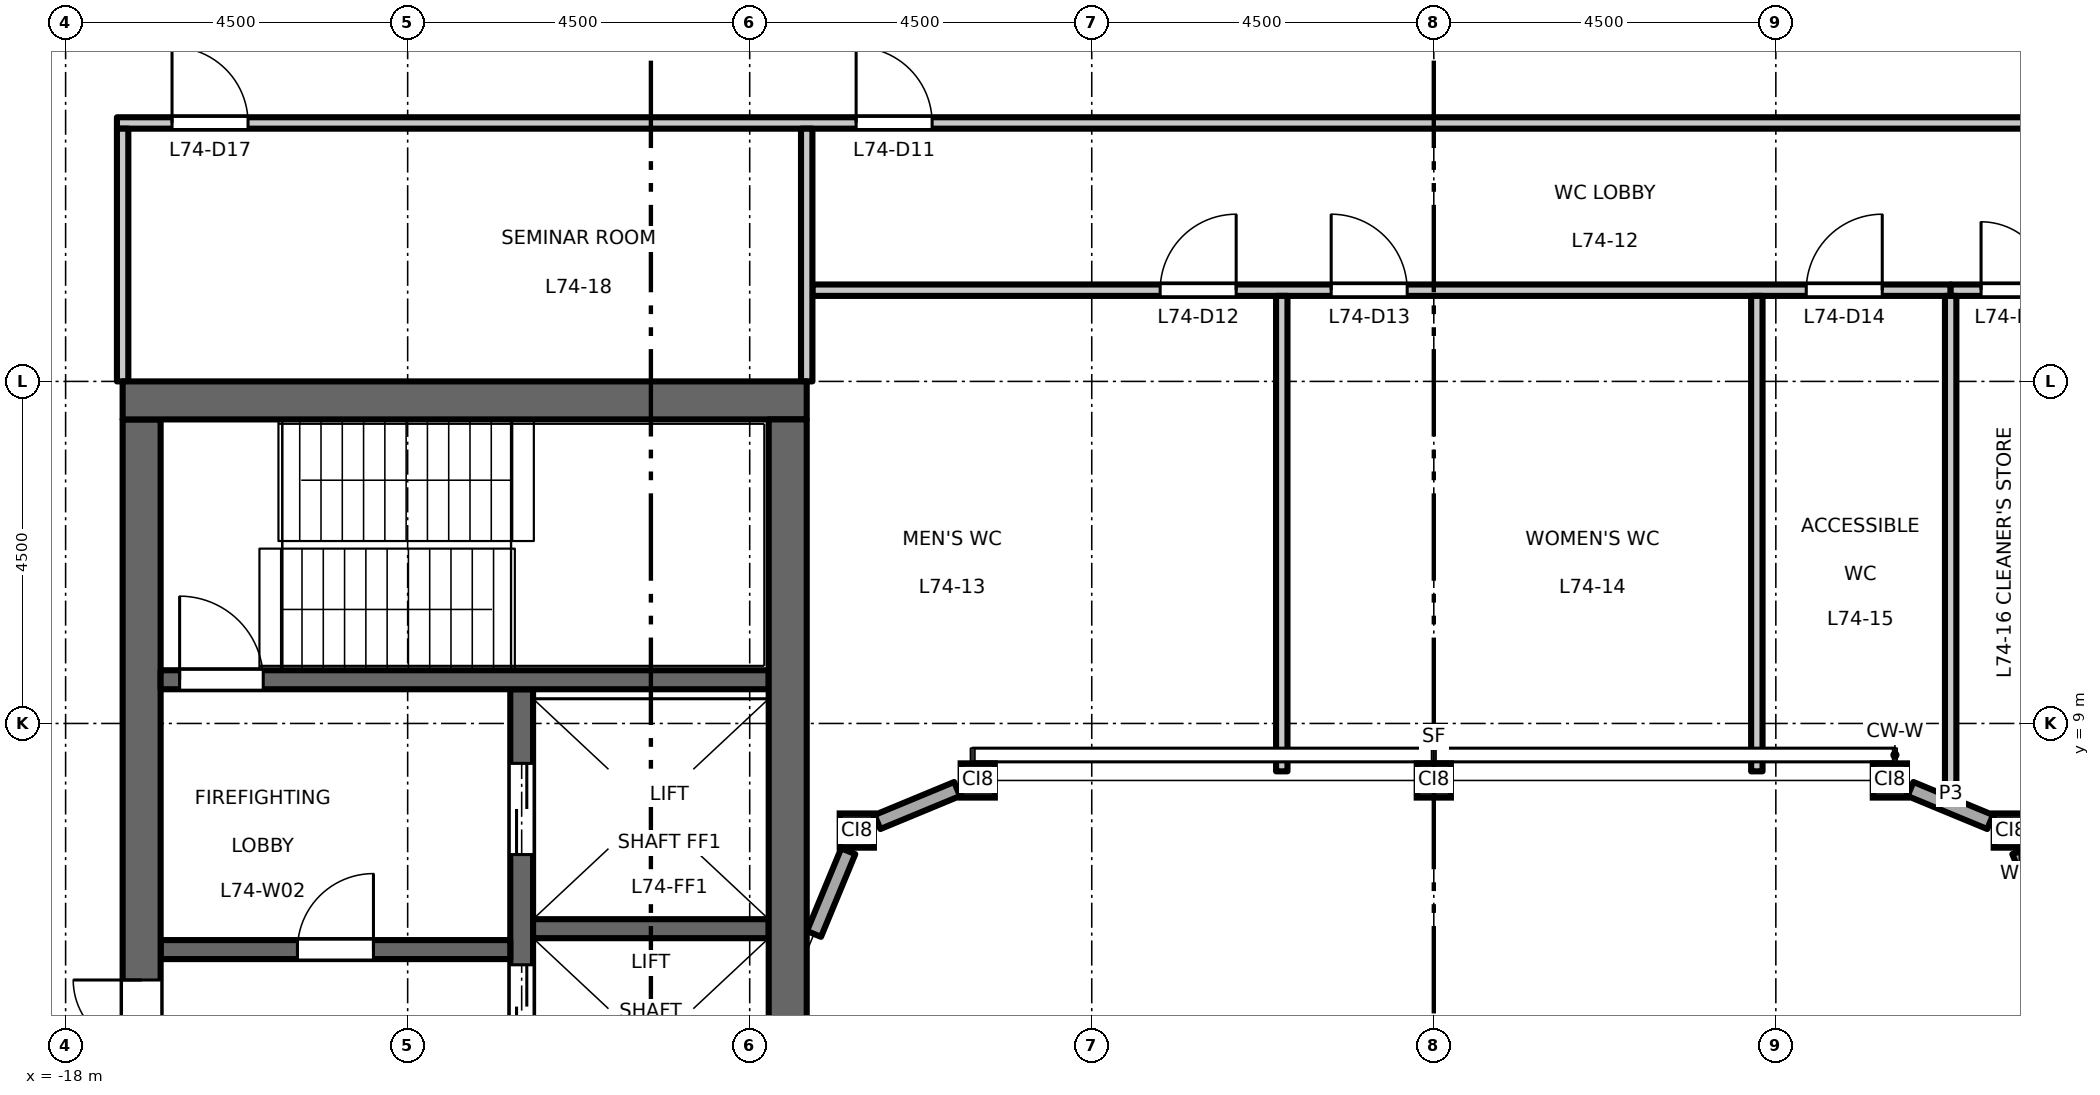
"""IFC4 building model, lengths in metres.
Left out: names, types, materials, properties, quantities, classifications, styles, units other than length and angle.
Written with IfcOpenShell. Run it as: python <this file> out.ifc"""

import sys

from ifc_helpers import new_model, si_unit, direction, frame, frame_2d, origin, origin_2d, place, context, subcontext, project, spatial, rectangle, hollow_rectangle, extrude, element, fill, save


model = new_model("IFC4")
c1 = context("Model", 3, precision=1e-05, world=origin(), true_north=direction((0.0, 1.0)))
c2 = subcontext(c1, "Body", "Model", "MODEL_VIEW")
j1 = project(units=[si_unit("LENGTHUNIT", "METRE"), si_unit("PLANEANGLEUNIT", "RADIAN")], contexts=[c1])
p1 = place(None, origin())
s1 = spatial("IfcSite", under=j1, at=p1, CompositionType="ELEMENT")
p2 = place(p1, origin())
s2 = spatial("IfcBuilding", under=s1, at=p2, CompositionType="ELEMENT")
p3 = place(p2, frame((0.0, 0.0, 343.7)))
s3 = spatial("IfcBuildingStorey", under=s2, at=p3, CompositionType="ELEMENT", Elevation=343.7)
for number, where, z_axis, x_axis in (
    (1, (-7.591, 7.591, 0.0), (0.0, 0.0, 1.0), (1.0, 0.0, 0.0)),
    (2, (-6.0, 8.25, 0.0), (0.0, 0.0, 1.0), (1.0, 0.0, 0.0)),
    (3, (0.0, 8.25, 0.0), (0.0, 0.0, 1.0), (1.0, 0.0, 0.0)),
    (4, (6.0, 8.25, 0.0), (0.0, 0.0, 1.0), (1.0, 0.0, 0.0)),
    (5, (7.591, 7.591, 0.0), (0.0, 0.0, 1.0), (1.0, 0.0, 0.0)),
):
    element("IfcColumn", number, at=place(p3, frame(where, z_axis=z_axis, x_axis=x_axis)), inside=s3, PredefinedType="COLUMN", context=c2, shape_type="SweptSolid", body=[
        extrude(hollow_rectangle(XDim=0.45, YDim=0.45, WallThickness=0.022, at=origin_2d()), origin(), (0.0, 0.0, 1.0), 4.5),
    ])
p4 = place(p3, frame((-12.0, -9.45, 0.0), z_axis=(0.0, 0.0, 1.0), x_axis=(0.0, 1.0, 0.0)))
e6 = element("IfcWall", 6, at=p4, inside=s3, PredefinedType="SHEAR", context=c2, shape_type="SweptSolid", body=[
    extrude(rectangle(XDim=18.9, YDim=0.3, at=frame_2d((9.45, 0.0))), origin(), (0.0, 0.0, 1.0), 4.3),
])
p5 = place(p4, frame((4.725, 0.0, 0.0)))
e7 = element("IfcOpeningElement", 7, at=p5, cuts=e6, PredefinedType="OPENING", context=c2, shape_type="SweptSolid", body=[
    extrude(rectangle(XDim=1.1, YDim=2.1, at=frame_2d((0.55, 1.05))), frame((0.0, 0.16, 0.0), z_axis=(0.0, -1.0, 0.0), x_axis=(1.0, 0.0, 0.0)), (0.0, 0.0, 1.0), 0.32),
])
p6 = place(p4, frame((7.875, 0.0, 0.0)))
e8 = element("IfcOpeningElement", 8, at=p6, cuts=e6, PredefinedType="OPENING", context=c2, shape_type="SweptSolid", body=[
    extrude(rectangle(XDim=1.1, YDim=2.1, at=frame_2d((0.55, 1.05))), frame((0.0, 0.16, 0.0), z_axis=(0.0, -1.0, 0.0), x_axis=(1.0, 0.0, 0.0)), (0.0, 0.0, 1.0), 0.32),
])
p7 = place(p4, frame((11.025, 0.0, 0.0)))
e9 = element("IfcOpeningElement", 9, at=p7, cuts=e6, PredefinedType="OPENING", context=c2, shape_type="SweptSolid", body=[
    extrude(rectangle(XDim=1.1, YDim=2.1, at=frame_2d((0.55, 1.05))), frame((0.0, 0.16, 0.0), z_axis=(0.0, -1.0, 0.0), x_axis=(1.0, 0.0, 0.0)), (0.0, 0.0, 1.0), 0.32),
])
p8 = place(p4, frame((14.175, 0.0, 0.0)))
e10 = element("IfcOpeningElement", 10, at=p8, cuts=e6, PredefinedType="OPENING", context=c2, shape_type="SweptSolid", body=[
    extrude(rectangle(XDim=1.1, YDim=2.1, at=frame_2d((0.55, 1.05))), frame((0.0, 0.16, 0.0), z_axis=(0.0, -1.0, 0.0), x_axis=(1.0, 0.0, 0.0)), (0.0, 0.0, 1.0), 0.32),
])
p9 = place(p4, frame((16.725, 0.0, 0.0)))
e11 = element("IfcOpeningElement", 11, at=p9, cuts=e6, PredefinedType="OPENING", context=c2, shape_type="SweptSolid", body=[
    extrude(rectangle(XDim=1.2, YDim=2.1, at=frame_2d((0.6, 1.05))), frame((0.0, 0.16, 0.0), z_axis=(0.0, -1.0, 0.0), x_axis=(1.0, 0.0, 0.0)), (0.0, 0.0, 1.0), 0.32),
])
p10 = place(p4, frame((0.975, 0.0, 0.0)))
e12 = element("IfcOpeningElement", 12, at=p10, cuts=e6, PredefinedType="OPENING", context=c2, shape_type="SweptSolid", body=[
    extrude(rectangle(XDim=1.2, YDim=2.1, at=frame_2d((0.6, 1.05))), frame((0.0, 0.16, 0.0), z_axis=(0.0, -1.0, 0.0), x_axis=(1.0, 0.0, 0.0)), (0.0, 0.0, 1.0), 0.32),
])
p11 = place(p3, frame((-12.15, 6.025, 0.0), z_axis=(0.0, 0.0, 1.0), x_axis=(-1.0, 0.0, 0.0)))
e13 = element("IfcWall", 13, at=p11, inside=s3, PredefinedType="SHEAR", context=c2, shape_type="SweptSolid", body=[
    extrude(rectangle(XDim=4.6, YDim=0.25, at=frame_2d((2.3, 0.0))), origin(), (0.0, 0.0, 1.0), 4.3),
])
p12 = place(p11, frame((1.8, 0.0, 0.0)))
e14 = element("IfcOpeningElement", 14, at=p12, cuts=e13, PredefinedType="OPENING", context=c2, shape_type="SweptSolid", body=[
    extrude(rectangle(XDim=1.0, YDim=2.1, at=frame_2d((0.5, 1.05))), frame((0.0, 0.135, 0.0), z_axis=(0.0, -1.0, 0.0), x_axis=(1.0, 0.0, 0.0)), (0.0, 0.0, 1.0), 0.27),
])
p13 = place(p3, frame((-17.0, -13.0, 0.0), z_axis=(0.0, 0.0, 1.0), x_axis=(0.0, 1.0, 0.0)))
e15 = element("IfcWall", 15, at=p13, inside=s3, PredefinedType="SHEAR", context=c2, shape_type="SweptSolid", body=[
    extrude(rectangle(XDim=26.0, YDim=0.5, at=frame_2d((13.0, 0.0))), origin(), (0.0, 0.0, 1.0), 4.3),
])
p14 = place(p13, frame((16.825, 0.0, 0.0)))
e16 = element("IfcOpeningElement", 16, at=p14, cuts=e15, PredefinedType="OPENING", context=c2, shape_type="SweptSolid", body=[
    extrude(rectangle(XDim=1.8, YDim=2.1, at=frame_2d((0.9, 1.05))), frame((0.0, 0.26, 0.0), z_axis=(0.0, -1.0, 0.0), x_axis=(1.0, 0.0, 0.0)), (0.0, 0.0, 1.0), 0.52),
])
p15 = place(p13, frame((7.375, 0.0, 0.0)))
e17 = element("IfcOpeningElement", 17, at=p15, cuts=e15, PredefinedType="OPENING", context=c2, shape_type="SweptSolid", body=[
    extrude(rectangle(XDim=1.8, YDim=2.1, at=frame_2d((0.9, 1.05))), frame((0.0, 0.26, 0.0), z_axis=(0.0, -1.0, 0.0), x_axis=(1.0, 0.0, 0.0)), (0.0, 0.0, 1.0), 0.52),
])
p16 = place(p3, frame((-8.75, 6.3, 0.0), z_axis=(0.0, 0.0, 1.0), x_axis=(-1.0, 0.0, 0.0)))
e18 = element("IfcWall", 18, at=p16, inside=s3, PredefinedType="SHEAR", context=c2, shape_type="SweptSolid", body=[
    extrude(rectangle(XDim=3.1, YDim=0.25, at=frame_2d((1.55, 0.0))), origin(), (0.0, 0.0, 1.0), 4.3),
])
p17 = place(p3, frame((-8.75, 9.575, 0.0), z_axis=(0.0, 0.0, 1.0), x_axis=(-1.0, 0.0, 0.0)))
e19 = element("IfcWall", 19, at=p17, inside=s3, PredefinedType="SHEAR", context=c2, shape_type="SweptSolid", body=[
    extrude(rectangle(XDim=8.0, YDim=0.25, at=frame_2d((4.0, 0.0))), origin(), (0.0, 0.0, 1.0), 4.3),
])
p18 = place(p17, frame((6.65, 0.0, 0.0)))
e20 = element("IfcOpeningElement", 20, at=p18, cuts=e19, PredefinedType="OPENING", context=c2, shape_type="SweptSolid", body=[
    extrude(rectangle(XDim=1.1, YDim=2.1, at=frame_2d((0.55, 1.05))), frame((0.0, 0.135, 0.0), z_axis=(0.0, -1.0, 0.0), x_axis=(1.0, 0.0, 0.0)), (0.0, 0.0, 1.0), 0.27),
])
p19 = place(p3, frame((-8.25, 13.25, 0.0), z_axis=(0.0, 0.0, 1.0), x_axis=(-1.0, 0.0, 0.0)))
e21 = element("IfcWall", 21, at=p19, inside=s3, PredefinedType="SHEAR", context=c2, shape_type="SweptSolid", body=[
    extrude(rectangle(XDim=9.0, YDim=0.5, at=frame_2d((4.5, 0.0))), origin(), (0.0, 0.0, 1.0), 4.3),
])
p20 = place(p3, frame((-8.5, -13.0, 0.0), z_axis=(0.0, 0.0, 1.0), x_axis=(0.0, 1.0, 0.0)))
e22 = element("IfcWall", 22, at=p20, inside=s3, PredefinedType="SHEAR", context=c2, shape_type="SweptSolid", body=[
    extrude(rectangle(XDim=26.0, YDim=0.5, at=frame_2d((13.0, 0.0))), origin(), (0.0, 0.0, 1.0), 4.3),
])
p21 = place(p3, frame((8.154, 6.231, 0.0), z_axis=(0.0, 0.0, 1.0), x_axis=(-0.382760542083, 0.92384758885, 0.0)))
e23 = element("IfcWall", 23, at=p21, inside=s3, PredefinedType="STANDARD", context=c2, shape_type="SweptSolid", body=[
    extrude(rectangle(XDim=1.178, YDim=0.2, at=frame_2d((0.589, 0.0))), origin(), (0.0, 0.0, 1.0), 3.96),
])
for number, where, z_axis, x_axis in (
    (24, (7.319, 7.703, 0.0), (0.0, 0.0, 1.0), (-0.924, 0.383, 0.0)),
    (25, (-6.271, 8.137, 0.0), (0.0, 0.0, 1.0), (-0.924, -0.383, 0.0)),
):
    element("IfcWall", number, at=place(p3, frame(where, z_axis=z_axis, x_axis=x_axis)), inside=s3, PredefinedType="STANDARD", context=c2, shape_type="SweptSolid", body=[
        extrude(rectangle(XDim=1.134, YDim=0.2, at=frame_2d((0.567, 0.0))), origin(), (0.0, 0.0, 1.0), 3.96),
    ])
p22 = place(p3, frame((-7.703, 7.319, 0.0), z_axis=(0.0, 0.0, 1.0), x_axis=(-0.382760542083, -0.92384758885, 0.0)))
e26 = element("IfcWall", 26, at=p22, inside=s3, PredefinedType="STANDARD", context=c2, shape_type="SweptSolid", body=[
    extrude(rectangle(XDim=1.178, YDim=0.2, at=frame_2d((0.589, 0.0))), origin(), (0.0, 0.0, 1.0), 3.96),
])
p23 = place(p3, frame((-8.175, 14.7, 0.0), z_axis=(0.0, 0.0, 1.0), x_axis=(1.0, 0.0, 0.0)))
e27 = element("IfcWall", 27, at=p23, inside=s3, PredefinedType="PARTITIONING", context=c2, shape_type="SweptSolid", body=[
    extrude(rectangle(XDim=14.975, YDim=0.15, at=frame_2d((7.488, 0.0))), origin(), (0.0, 0.0, 1.0), 4.3),
])
p24 = place(p23, frame((4.575, 0.0, 0.0)))
e28 = element("IfcOpeningElement", 28, at=p24, cuts=e27, PredefinedType="OPENING", context=c2, shape_type="SweptSolid", body=[
    extrude(rectangle(XDim=1.0, YDim=2.1, at=frame_2d((0.5, 1.05))), frame((0.0, 0.085, 0.0), z_axis=(0.0, -1.0, 0.0), x_axis=(1.0, 0.0, 0.0)), (0.0, 0.0, 1.0), 0.17),
])
p25 = place(p23, frame((6.825, 0.0, 0.0)))
e29 = element("IfcOpeningElement", 29, at=p25, cuts=e27, PredefinedType="OPENING", context=c2, shape_type="SweptSolid", body=[
    extrude(rectangle(XDim=1.0, YDim=2.1, at=frame_2d((0.5, 1.05))), frame((0.0, 0.085, 0.0), z_axis=(0.0, -1.0, 0.0), x_axis=(1.0, 0.0, 0.0)), (0.0, 0.0, 1.0), 0.17),
])
p26 = place(p23, frame((13.075, 0.0, 0.0)))
e30 = element("IfcOpeningElement", 30, at=p26, cuts=e27, PredefinedType="OPENING", context=c2, shape_type="SweptSolid", body=[
    extrude(rectangle(XDim=1.0, YDim=2.1, at=frame_2d((0.5, 1.05))), frame((0.0, 0.085, 0.0), z_axis=(0.0, -1.0, 0.0), x_axis=(1.0, 0.0, 0.0)), (0.0, 0.0, 1.0), 0.17),
])
p27 = place(p3, frame((6.8, 14.7, 0.0), z_axis=(0.0, 0.0, 1.0), x_axis=(1.0, 0.0, 0.0)))
e31 = element("IfcWall", 31, at=p27, inside=s3, PredefinedType="PARTITIONING", context=c2, shape_type="SweptSolid", body=[
    extrude(rectangle(XDim=1.375, YDim=0.15, at=frame_2d((0.688, 0.0))), origin(), (0.0, 0.0, 1.0), 4.3),
])
p28 = place(p27, frame((0.4, 0.0, 0.0)))
e32 = element("IfcOpeningElement", 32, at=p28, cuts=e31, PredefinedType="OPENING", context=c2, shape_type="SweptSolid", body=[
    extrude(rectangle(XDim=0.9, YDim=2.1, at=frame_2d((0.45, 1.05))), frame((0.0, 0.085, 0.0), z_axis=(0.0, -1.0, 0.0), x_axis=(1.0, 0.0, 0.0)), (0.0, 0.0, 1.0), 0.17),
])
p29 = place(p3, frame((-17.325, 16.9, 0.0), z_axis=(0.0, 0.0, 1.0), x_axis=(1.0, 0.0, 0.0)))
e33 = element("IfcWall", 33, at=p29, inside=s3, PredefinedType="PARTITIONING", context=c2, shape_type="SweptSolid", body=[
    extrude(rectangle(XDim=34.65, YDim=0.15, at=frame_2d((17.325, 0.0))), origin(), (0.0, 0.0, 1.0), 4.3),
])
p30 = place(p29, frame((9.725, 0.0, 0.0)))
e34 = element("IfcOpeningElement", 34, at=p30, cuts=e33, PredefinedType="OPENING", context=c2, shape_type="SweptSolid", body=[
    extrude(rectangle(XDim=1.0, YDim=2.1, at=frame_2d((0.5, 1.05))), frame((0.0, 0.085, 0.0), z_axis=(0.0, -1.0, 0.0), x_axis=(1.0, 0.0, 0.0)), (0.0, 0.0, 1.0), 0.17),
])
p31 = place(p29, frame((0.725, 0.0, 0.0)))
e35 = element("IfcOpeningElement", 35, at=p31, cuts=e33, PredefinedType="OPENING", context=c2, shape_type="SweptSolid", body=[
    extrude(rectangle(XDim=1.0, YDim=2.1, at=frame_2d((0.5, 1.05))), frame((0.0, 0.085, 0.0), z_axis=(0.0, -1.0, 0.0), x_axis=(1.0, 0.0, 0.0)), (0.0, 0.0, 1.0), 0.17),
])
p32 = place(p29, frame((32.975, 0.0, 0.0)))
e36 = element("IfcOpeningElement", 36, at=p32, cuts=e33, PredefinedType="OPENING", context=c2, shape_type="SweptSolid", body=[
    extrude(rectangle(XDim=1.0, YDim=2.1, at=frame_2d((0.5, 1.05))), frame((0.0, 0.085, 0.0), z_axis=(0.0, -1.0, 0.0), x_axis=(1.0, 0.0, 0.0)), (0.0, 0.0, 1.0), 0.17),
])
for number, where, z_axis, x_axis in (
    (37, (-17.25, 13.5, 0.0), (0.0, 0.0, 1.0), (0.0, 1.0, 0.0)),
    (38, (-8.25, 13.5, 0.0), (0.0, 0.0, 1.0), (0.0, 1.0, 0.0)),
):
    element("IfcWall", number, at=place(p3, frame(where, z_axis=z_axis, x_axis=x_axis)), inside=s3, PredefinedType="PARTITIONING", context=c2, shape_type="SweptSolid", body=[
        extrude(rectangle(XDim=3.325, YDim=0.15, at=frame_2d((1.663, 0.0))), origin(), (0.0, 0.0, 1.0), 4.3),
    ])
for number, where, z_axis, x_axis in (
    (39, (-2.0, 8.37, 0.0), (0.0, 0.0, 1.0), (0.0, 1.0, 0.0)),
    (40, (4.25, 8.37, 0.0), (0.0, 0.0, 1.0), (0.0, 1.0, 0.0)),
):
    element("IfcWall", number, at=place(p3, frame(where, z_axis=z_axis, x_axis=x_axis)), inside=s3, PredefinedType="PARTITIONING", context=c2, shape_type="SweptSolid", body=[
        extrude(rectangle(XDim=6.255, YDim=0.15, at=frame_2d((3.127, 0.0))), origin(), (0.0, 0.0, 1.0), 4.3),
    ])
p33 = place(p3, frame((6.8, 8.069, 0.0), z_axis=(0.0, 0.0, 1.0), x_axis=(0.0, 1.0, 0.0)))
e41 = element("IfcWall", 41, at=p33, inside=s3, PredefinedType="PARTITIONING", context=c2, shape_type="SweptSolid", body=[
    extrude(rectangle(XDim=6.556, YDim=0.15, at=frame_2d((3.278, 0.0))), origin(), (0.0, 0.0, 1.0), 4.3),
])
p34 = place(p12, origin())
e42 = element("IfcDoor", 42, at=p34, inside=s3, OperationType="SINGLE_SWING_LEFT", PredefinedType="DOOR", context=c2, shape_type="SweptSolid", body=[
    extrude(rectangle(XDim=1.0, YDim=2.1, at=frame_2d((0.5, 1.05))), frame((0.0, 0.025, 0.0), z_axis=(0.0, -1.0, 0.0), x_axis=(1.0, 0.0, 0.0)), (0.0, 0.0, 1.0), 0.05),
])
fill(e14, e42)
p35 = place(p18, origin())
e43 = element("IfcDoor", 43, at=p35, inside=s3, OperationType="SINGLE_SWING_RIGHT", PredefinedType="DOOR", context=c2, shape_type="SweptSolid", body=[
    extrude(rectangle(XDim=1.1, YDim=2.1, at=frame_2d((0.55, 1.05))), frame((0.0, 0.025, 0.0), z_axis=(0.0, -1.0, 0.0), x_axis=(1.0, 0.0, 0.0)), (0.0, 0.0, 1.0), 0.05),
])
fill(e20, e43)
p36 = place(p14, origin())
e44 = element("IfcDoor", 44, at=p36, inside=s3, OperationType="DOUBLE_DOOR_DOUBLE_SWING", PredefinedType="DOOR", context=c2, shape_type="SweptSolid", body=[
    extrude(rectangle(XDim=1.8, YDim=2.1, at=frame_2d((0.9, 1.05))), frame((0.0, 0.025, 0.0), z_axis=(0.0, -1.0, 0.0), x_axis=(1.0, 0.0, 0.0)), (0.0, 0.0, 1.0), 0.05),
])
fill(e16, e44)
p37 = place(p8, origin())
e45 = element("IfcDoor", 45, at=p37, inside=s3, OperationType="DOUBLE_DOOR_SLIDING", PredefinedType="DOOR", context=c2, shape_type="SweptSolid", body=[
    extrude(rectangle(XDim=1.1, YDim=2.1, at=frame_2d((0.55, 1.05))), frame((0.0, 0.025, 0.0), z_axis=(0.0, -1.0, 0.0), x_axis=(1.0, 0.0, 0.0)), (0.0, 0.0, 1.0), 0.05),
])
fill(e10, e45)
p38 = place(p9, origin())
e46 = element("IfcDoor", 46, at=p38, inside=s3, OperationType="DOUBLE_DOOR_SLIDING", PredefinedType="DOOR", context=c2, shape_type="SweptSolid", body=[
    extrude(rectangle(XDim=1.2, YDim=2.1, at=frame_2d((0.6, 1.05))), frame((0.0, 0.025, 0.0), z_axis=(0.0, -1.0, 0.0), x_axis=(1.0, 0.0, 0.0)), (0.0, 0.0, 1.0), 0.05),
])
fill(e11, e46)
p39 = place(p30, origin())
e47 = element("IfcDoor", 47, at=p39, inside=s3, OperationType="SINGLE_SWING_LEFT", PredefinedType="DOOR", context=c2, shape_type="SweptSolid", body=[
    extrude(rectangle(XDim=1.0, YDim=2.1, at=frame_2d((0.5, 1.05))), frame((0.0, 0.025, 0.0), z_axis=(0.0, -1.0, 0.0), x_axis=(1.0, 0.0, 0.0)), (0.0, 0.0, 1.0), 0.05),
])
fill(e34, e47)
p40 = place(p24, origin())
e48 = element("IfcDoor", 48, at=p40, inside=s3, OperationType="SINGLE_SWING_RIGHT", PredefinedType="DOOR", context=c2, shape_type="SweptSolid", body=[
    extrude(rectangle(XDim=1.0, YDim=2.1, at=frame_2d((0.5, 1.05))), frame((0.0, 0.025, 0.0), z_axis=(0.0, -1.0, 0.0), x_axis=(1.0, 0.0, 0.0)), (0.0, 0.0, 1.0), 0.05),
])
fill(e28, e48)
p41 = place(p25, origin())
e49 = element("IfcDoor", 49, at=p41, inside=s3, OperationType="SINGLE_SWING_LEFT", PredefinedType="DOOR", context=c2, shape_type="SweptSolid", body=[
    extrude(rectangle(XDim=1.0, YDim=2.1, at=frame_2d((0.5, 1.05))), frame((0.0, 0.025, 0.0), z_axis=(0.0, -1.0, 0.0), x_axis=(1.0, 0.0, 0.0)), (0.0, 0.0, 1.0), 0.05),
])
fill(e29, e49)
p42 = place(p26, origin())
e50 = element("IfcDoor", 50, at=p42, inside=s3, OperationType="SINGLE_SWING_RIGHT", PredefinedType="DOOR", context=c2, shape_type="SweptSolid", body=[
    extrude(rectangle(XDim=1.0, YDim=2.1, at=frame_2d((0.5, 1.05))), frame((0.0, 0.025, 0.0), z_axis=(0.0, -1.0, 0.0), x_axis=(1.0, 0.0, 0.0)), (0.0, 0.0, 1.0), 0.05),
])
fill(e30, e50)
p43 = place(p28, origin())
e51 = element("IfcDoor", 51, at=p43, inside=s3, OperationType="SINGLE_SWING_LEFT", PredefinedType="DOOR", context=c2, shape_type="SweptSolid", body=[
    extrude(rectangle(XDim=0.9, YDim=2.1, at=frame_2d((0.45, 1.05))), frame((0.0, 0.025, 0.0), z_axis=(0.0, -1.0, 0.0), x_axis=(1.0, 0.0, 0.0)), (0.0, 0.0, 1.0), 0.05),
])
fill(e32, e51)
p44 = place(p31, origin())
e52 = element("IfcDoor", 52, at=p44, inside=s3, OperationType="SINGLE_SWING_LEFT", PredefinedType="DOOR", context=c2, shape_type="SweptSolid", body=[
    extrude(rectangle(XDim=1.0, YDim=2.1, at=frame_2d((0.5, 1.05))), frame((0.0, 0.025, 0.0), z_axis=(0.0, -1.0, 0.0), x_axis=(1.0, 0.0, 0.0)), (0.0, 0.0, 1.0), 0.05),
])
fill(e35, e52)
save(model, sys.argv[1])
